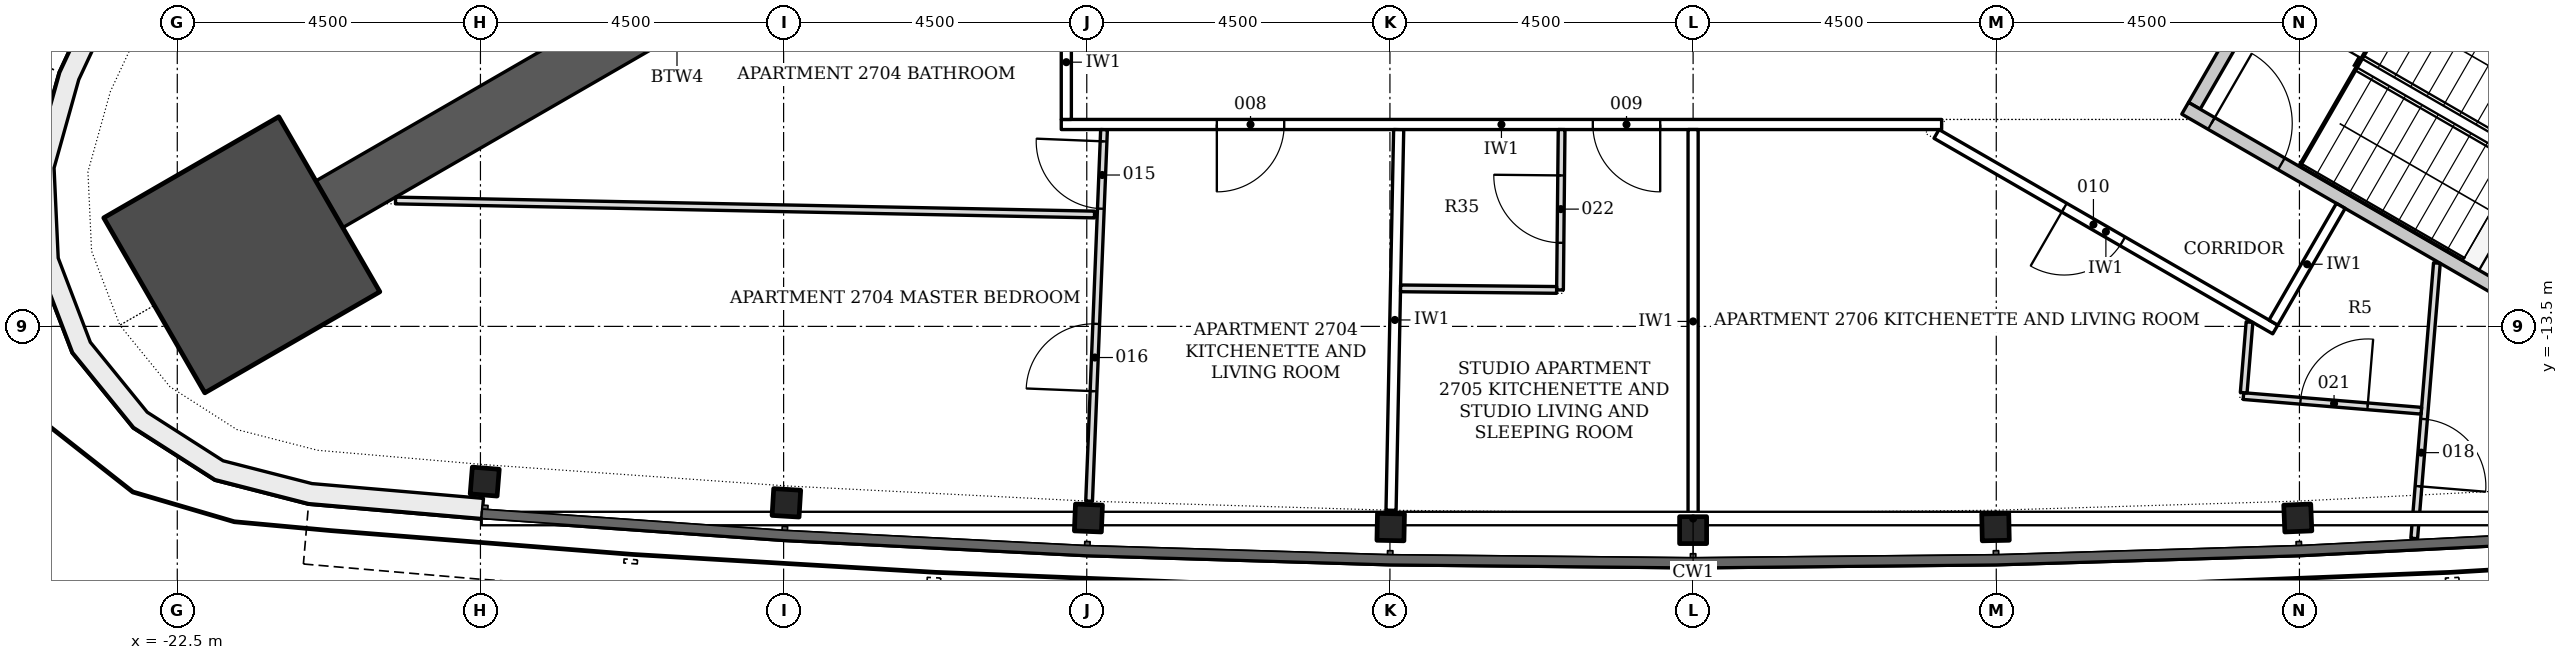
"""IFC4 building model, lengths in metres.
Left out: names, types, materials, properties, quantities, classifications, styles, units other than length and angle.
Written with IfcOpenShell. Run it as: python <this file> out.ifc"""

import sys

from ifc_helpers import new_model, si_unit, direction, frame, frame_2d, origin, origin_2d, place, context, subcontext, project, spatial, polyline, rectangle, i_section, outline, extrude, element, fill, save


model = new_model("IFC4")
c1 = context("Model", 3, precision=1e-05, world=origin(), true_north=direction((0.0, 1.0)))
c2 = subcontext(c1, "Body", "Model", "MODEL_VIEW")
j1 = project(units=[si_unit("LENGTHUNIT", "METRE"), si_unit("PLANEANGLEUNIT", "RADIAN")], contexts=[c1])
p1 = place(None, origin())
s1 = spatial("IfcSite", under=j1, at=p1, CompositionType="ELEMENT")
p2 = place(p1, origin())
s2 = spatial("IfcBuilding", under=s1, at=p2, CompositionType="ELEMENT")
p3 = place(p2, frame((0.0, 0.0, 105.9)))
s3 = spatial("IfcBuildingStorey", under=s2, at=p3, CompositionType="ELEMENT", Elevation=105.9)
for number, where, z_axis, x_axis in (
    (1, (-9.922, -5.728, -0.2), (0.0, 0.0, 1.0), (-0.866, -0.5, 0.0)),
    (2, (9.922, -5.728, -0.2), (0.0, 0.0, 1.0), (0.866, -0.5, 0.0)),
):
    element("IfcWall", number, at=place(p3, frame(where, z_axis=z_axis, x_axis=x_axis)), inside=s3, PredefinedType="SHEAR", context=c2, shape_type="SweptSolid", body=[
        extrude(rectangle(XDim=11.918, YDim=0.8, at=frame_2d((5.959, 0.0))), origin(), (0.0, 0.0, 1.0), 3.6),
    ])
p4 = place(p3, frame((-21.542, -12.438, -0.2), z_axis=(0.0, 0.0, 1.0), x_axis=(-0.866025403784, -0.5, 0.0)))
e3 = element("IfcColumn", 3, at=p4, inside=s3, PredefinedType="COLUMN", context=c2, shape_type="SweptSolid", body=[
    extrude(rectangle(XDim=3.0, YDim=3.0, at=origin_2d()), origin(), (0.0, 0.0, 1.0), 3.6),
])
for number, where, z_axis, x_axis in (
    (4, (-17.937, -15.804, -0.2), (0.0, 0.0, 1.0), (0.997, -0.08, 0.0)),
    (5, (-13.459, -16.119, -0.2), (0.0, 0.0, 1.0), (0.998, -0.06, 0.0)),
    (6, (-8.976, -16.344, -0.2), (0.0, 0.0, 1.0), (0.999, -0.04, 0.0)),
    (7, (-4.489, -16.479, -0.2), (0.0, 0.0, 1.0), (1.0, -0.02, 0.0)),
    (8, (0.0, -16.524, -0.2), (0.0, 0.0, 1.0), (1.0, 0.0, 0.0)),
    (9, (4.489, -16.479, -0.2), (0.0, 0.0, 1.0), (1.0, 0.02, 0.0)),
    (10, (8.976, -16.344, -0.2), (0.0, 0.0, 1.0), (0.999, 0.04, 0.0)),
):
    element("IfcColumn", number, at=place(p3, frame(where, z_axis=z_axis, x_axis=x_axis)), inside=s3, PredefinedType="COLUMN", context=c2, shape_type="SweptSolid", body=[
        extrude(i_section(OverallWidth=0.401, OverallDepth=0.399, WebThickness=0.025, FlangeThickness=0.04, FilletRadius=0.015, at=origin_2d()), origin(), (0.0, 0.0, 1.0), 3.6),
    ])
p5 = place(p3, origin())
e11 = element("IfcWall", 11, at=p5, inside=s3, PredefinedType="NOTDEFINED", context=c2, shape_type="SweptSolid", body=[
    extrude(outline(polyline([(-23.152, -7.396), (-24.245, -9.732), (-24.631, -11.114), (-24.565, -12.547), (-24.054, -13.887), (-23.148, -15.0), (-21.94, -15.774), (-20.551, -16.13), (-17.981, -16.352), (-17.955, -16.053), (-20.5, -15.833), (-21.819, -15.495), (-22.946, -14.774), (-23.791, -13.735), (-24.267, -12.485), (-24.329, -11.148), (-23.962, -9.837), (-22.88, -7.523), (-23.152, -7.396)])), origin(), (0.0, 0.0, 1.0), 3.3),
])
p6 = place(p3, frame((7.44, -10.226, -0.2), z_axis=(0.0, 0.0, 1.0), x_axis=(0.500022077904, 0.866012656725, 0.0)))
e12 = element("IfcWall", 12, at=p6, inside=s3, PredefinedType="SHEAR", context=c2, shape_type="SweptSolid", body=[
    extrude(rectangle(XDim=3.55, YDim=0.2, at=frame_2d((1.775, 0.0))), origin(), (0.0, 0.0, 1.0), 3.6),
])
p7 = place(p6, frame((1.175, 0.0, 0.2)))
e13 = element("IfcOpeningElement", 13, at=p7, cuts=e12, PredefinedType="OPENING", context=c2, shape_type="SweptSolid", body=[
    extrude(rectangle(XDim=1.2, YDim=2.1, at=frame_2d((0.6, 1.05))), frame((0.0, 0.11, 0.0), z_axis=(0.0, -1.0, 0.0), x_axis=(1.0, 0.0, 0.0)), (0.0, 0.0, 1.0), 0.22),
])
p8 = place(p3, frame((7.304, -10.262, -0.2), z_axis=(0.0, 0.0, 1.0), x_axis=(0.866026594901, -0.49999793692, 0.0)))
e14 = element("IfcWall", 14, at=p8, inside=s3, PredefinedType="SHEAR", context=c2, shape_type="SweptSolid", body=[
    extrude(rectangle(XDim=5.6, YDim=0.2, at=frame_2d((2.8, 0.0))), origin(), (0.0, 0.0, 1.0), 3.6),
])
p9 = place(p8, frame((0.45, 0.0, 0.2)))
e15 = element("IfcOpeningElement", 15, at=p9, cuts=e14, PredefinedType="OPENING", context=c2, shape_type="SweptSolid", body=[
    extrude(rectangle(XDim=1.2, YDim=2.1, at=frame_2d((0.6, 1.05))), frame((0.0, 0.11, 0.0), z_axis=(0.0, -1.0, 0.0), x_axis=(1.0, 0.0, 0.0)), (0.0, 0.0, 1.0), 0.22),
])
p10 = place(p3, frame((9.425, -6.588, -0.2), z_axis=(0.0, 0.0, 1.0), x_axis=(0.866018442252, -0.500012057535, 0.0)))
e16 = element("IfcWall", 16, at=p10, inside=s3, PredefinedType="SHEAR", context=c2, shape_type="SweptSolid", body=[
    extrude(rectangle(XDim=7.2, YDim=1.186, at=frame_2d((3.6, 0.0))), origin(), (0.0, 0.0, 1.0), 3.6),
])
p11 = place(p3, frame((3.689, -10.503, 0.0), z_axis=(0.0, 0.0, 1.0), x_axis=(-1.0, 0.0, 0.0)))
e17 = element("IfcWall", 17, at=p11, inside=s3, PredefinedType="PARTITIONING", context=c2, shape_type="SweptSolid", body=[
    extrude(rectangle(XDim=13.068, YDim=0.15, at=frame_2d((6.534, 0.0))), origin(), (0.0, 0.0, 1.0), 2.847),
])
p12 = place(p11, frame((9.758, 0.0, 0.0)))
e18 = element("IfcOpeningElement", 18, at=p12, cuts=e17, PredefinedType="OPENING", context=c2, shape_type="SweptSolid", body=[
    extrude(rectangle(XDim=1.0, YDim=2.1, at=frame_2d((0.5, 1.05))), frame((0.0, 0.085, 0.0), z_axis=(0.0, -1.0, 0.0), x_axis=(1.0, 0.0, 0.0)), (0.0, 0.0, 1.0), 0.17),
])
p13 = place(p11, frame((4.177, 0.0, 0.0)))
e19 = element("IfcOpeningElement", 19, at=p13, cuts=e17, PredefinedType="OPENING", context=c2, shape_type="SweptSolid", body=[
    extrude(rectangle(XDim=1.0, YDim=2.1, at=frame_2d((0.5, 1.05))), frame((0.0, 0.085, 0.0), z_axis=(0.0, -1.0, 0.0), x_axis=(1.0, 0.0, 0.0)), (0.0, 0.0, 1.0), 0.17),
])
p14 = place(p3, frame((8.641, -13.546, 0.0), z_axis=(0.0, 0.0, 1.0), x_axis=(-0.866042728627, 0.499969991291, 0.0)))
e20 = element("IfcWall", 20, at=p14, inside=s3, PredefinedType="PARTITIONING", context=c2, shape_type="SweptSolid", body=[
    extrude(rectangle(XDim=5.805, YDim=0.15, at=frame_2d((2.903, 0.0))), origin(), (0.0, 0.0, 1.0), 2.847),
])
p15 = place(p14, frame((2.616, 0.0, 0.0)))
e21 = element("IfcOpeningElement", 21, at=p15, cuts=e20, PredefinedType="OPENING", context=c2, shape_type="SweptSolid", body=[
    extrude(rectangle(XDim=1.0, YDim=2.1, at=frame_2d((0.5, 1.05))), frame((0.0, 0.085, 0.0), z_axis=(0.0, -1.0, 0.0), x_axis=(1.0, 0.0, 0.0)), (0.0, 0.0, 1.0), 0.17),
])
p16 = place(p3, frame((8.614, -13.444, 0.0), z_axis=(0.0, 0.0, 1.0), x_axis=(0.499972520799, 0.866041268327, 0.0)))
e22 = element("IfcWall", 22, at=p16, inside=s3, PredefinedType="PARTITIONING", context=c2, shape_type="SweptSolid", body=[
    extrude(rectangle(XDim=2.0, YDim=0.15, at=frame_2d((1.0, 0.0))), origin(), (0.0, 0.0, 1.0), 2.923),
])
p17 = place(p3, frame((-9.304, -10.428, 0.0), z_axis=(0.0, 0.0, 1.0), x_axis=(0.0, 1.0, 0.0)))
e23 = element("IfcWall", 23, at=p17, inside=s3, PredefinedType="PARTITIONING", context=c2, shape_type="SweptSolid", body=[
    extrude(rectangle(XDim=1.7, YDim=0.15, at=frame_2d((0.85, 0.0))), origin(), (0.0, 0.0, 1.0), 3.4),
])
p18 = place(p3, frame((0.0, -16.274, 0.0), z_axis=(0.0, 0.0, 1.0), x_axis=(0.0, 1.0, 0.0)))
e24 = element("IfcWall", 24, at=p18, inside=s3, PredefinedType="PARTITIONING", context=c2, shape_type="SweptSolid", body=[
    extrude(rectangle(XDim=5.696, YDim=0.15, at=frame_2d((2.848, 0.0))), origin(), (0.0, 0.0, 1.0), 2.847),
])
p19 = place(p3, frame((-4.484, -16.229, 0.0), z_axis=(0.0, 0.0, 1.0), x_axis=(0.020089281754, 0.999798190016, 0.0)))
e25 = element("IfcWall", 25, at=p19, inside=s3, PredefinedType="PARTITIONING", context=c2, shape_type="SweptSolid", body=[
    extrude(rectangle(XDim=5.651, YDim=0.15, at=frame_2d((2.826, 0.0))), origin(), (0.0, 0.0, 1.0), 2.847),
])
p20 = place(p3, frame((-8.885, -11.839, 0.0), z_axis=(0.0, 0.0, 1.0), x_axis=(-0.999798608679, 0.020068434987, 0.0)))
e26 = element("IfcWall", 26, at=p20, inside=s3, PredefinedType="PARTITIONING", context=c2, shape_type="SweptSolid", body=[
    extrude(rectangle(XDim=10.377, YDim=0.1, at=frame_2d((5.188, 0.0))), origin(), (0.0, 0.0, 1.0), 2.847),
])
p21 = place(p3, frame((-8.966, -16.094, 0.0), z_axis=(0.0, 0.0, 1.0), x_axis=(0.040167671745, 0.999192953411, 0.0)))
e27 = element("IfcWall", 27, at=p21, inside=s3, PredefinedType="PARTITIONING", context=c2, shape_type="SweptSolid", body=[
    extrude(rectangle(XDim=5.519, YDim=0.1, at=frame_2d((2.759, 0.0))), origin(), (0.0, 0.0, 1.0), 2.847),
])
p22 = place(p21, frame((4.345, 0.0, 0.0)))
e28 = element("IfcOpeningElement", 28, at=p22, cuts=e27, PredefinedType="OPENING", context=c2, shape_type="SweptSolid", body=[
    extrude(rectangle(XDim=1.0, YDim=2.1, at=frame_2d((0.5, 1.05))), frame((0.0, 0.06, 0.0), z_axis=(0.0, -1.0, 0.0), x_axis=(1.0, 0.0, 0.0)), (0.0, 0.0, 1.0), 0.12),
])
p23 = place(p21, frame((1.634, 0.0, 0.0)))
e29 = element("IfcOpeningElement", 29, at=p23, cuts=e27, PredefinedType="OPENING", context=c2, shape_type="SweptSolid", body=[
    extrude(rectangle(XDim=1.0, YDim=2.1, at=frame_2d((0.5, 1.05))), frame((0.0, 0.06, 0.0), z_axis=(0.0, -1.0, 0.0), x_axis=(1.0, 0.0, 0.0)), (0.0, 0.0, 1.0), 0.12),
])
p24 = place(p3, frame((11.04, -12.56, 0.0), z_axis=(0.0, 0.0, 1.0), x_axis=(-0.08207509454, -0.996626147989, 0.0)))
e30 = element("IfcWall", 30, at=p24, inside=s3, PredefinedType="PARTITIONING", context=c2, shape_type="SweptSolid", body=[
    extrude(rectangle(XDim=4.102, YDim=0.1, at=frame_2d((2.051, 0.0))), origin(), (0.0, 0.0, 1.0), 2.974),
])
p25 = place(p24, frame((2.324, 0.0, 0.0)))
e31 = element("IfcOpeningElement", 31, at=p25, cuts=e30, PredefinedType="OPENING", context=c2, shape_type="SweptSolid", body=[
    extrude(rectangle(XDim=1.0, YDim=2.1, at=frame_2d((0.5, 1.05))), frame((0.0, 0.06, 0.0), z_axis=(0.0, -1.0, 0.0), x_axis=(1.0, 0.0, 0.0)), (0.0, 0.0, 1.0), 0.12),
])
p26 = place(p3, frame((8.168, -14.534, 0.0), z_axis=(0.0, 0.0, 1.0), x_axis=(0.996625350035, -0.082084783406, 0.0)))
e32 = element("IfcWall", 32, at=p26, inside=s3, PredefinedType="PARTITIONING", context=c2, shape_type="SweptSolid", body=[
    extrude(rectangle(XDim=2.65, YDim=0.1, at=frame_2d((1.325, 0.0))), origin(), (0.0, 0.0, 1.0), 2.923),
])
p27 = place(p26, frame((0.85, 0.0, 0.0)))
e33 = element("IfcOpeningElement", 33, at=p27, cuts=e32, PredefinedType="OPENING", context=c2, shape_type="SweptSolid", body=[
    extrude(rectangle(XDim=1.0, YDim=2.1, at=frame_2d((0.5, 1.05))), frame((0.0, 0.06, 0.0), z_axis=(0.0, -1.0, 0.0), x_axis=(1.0, 0.0, 0.0)), (0.0, 0.0, 1.0), 0.12),
])
p28 = place(p3, frame((-1.976, -12.959, 0.0), z_axis=(0.0, 0.0, 1.0), x_axis=(0.009947205513, 0.999950525327, 0.0)))
e34 = element("IfcWall", 34, at=p28, inside=s3, PredefinedType="PARTITIONING", context=c2, shape_type="SweptSolid", body=[
    extrude(rectangle(XDim=2.381, YDim=0.1, at=frame_2d((1.19, 0.0))), origin(), (0.0, 0.0, 1.0), 3.4),
])
p29 = place(p28, frame((0.7, 0.0, 0.0)))
e35 = element("IfcOpeningElement", 35, at=p29, cuts=e34, PredefinedType="OPENING", context=c2, shape_type="SweptSolid", body=[
    extrude(rectangle(XDim=1.0, YDim=2.1, at=frame_2d((0.5, 1.05))), frame((0.0, 0.06, 0.0), z_axis=(0.0, -1.0, 0.0), x_axis=(1.0, 0.0, 0.0)), (0.0, 0.0, 1.0), 0.12),
])
p30 = place(p3, frame((-4.342, -12.936, 0.0), z_axis=(0.0, 0.0, 1.0), x_axis=(0.999949877213, -0.010012145693, 0.0)))
e36 = element("IfcWall", 36, at=p30, inside=s3, PredefinedType="PARTITIONING", context=c2, shape_type="SweptSolid", body=[
    extrude(rectangle(XDim=2.316, YDim=0.1, at=frame_2d((1.158, 0.0))), origin(), (0.0, 0.0, 1.0), 2.847),
])
p31 = place(p3, frame((8.259, -13.437, 0.0), z_axis=(0.0, 0.0, 1.0), x_axis=(-0.082180892167, -0.99661742959, 0.0)))
e37 = element("IfcWall", 37, at=p31, inside=s3, PredefinedType="PARTITIONING", context=c2, shape_type="SweptSolid", body=[
    extrude(rectangle(XDim=1.052, YDim=0.1, at=frame_2d((0.526, 0.0))), origin(), (0.0, 0.0, 1.0), 3.4),
])
p32 = place(p9, origin())
e38 = element("IfcDoor", 38, at=p32, inside=s3, OperationType="SINGLE_SWING_LEFT", PredefinedType="DOOR", context=c2, shape_type="SweptSolid", body=[
    extrude(rectangle(XDim=1.2, YDim=2.1, at=frame_2d((0.6, 1.05))), frame((0.0, 0.025, 0.0), z_axis=(0.0, -1.0, 0.0), x_axis=(1.0, 0.0, 0.0)), (0.0, 0.0, 1.0), 0.05),
])
fill(e15, e38)
p33 = place(p12, origin())
e39 = element("IfcDoor", 39, at=p33, inside=s3, OperationType="SINGLE_SWING_RIGHT", PredefinedType="DOOR", context=c2, shape_type="SweptSolid", body=[
    extrude(rectangle(XDim=1.0, YDim=2.1, at=frame_2d((0.5, 1.05))), frame((0.0, 0.025, 0.0), z_axis=(0.0, -1.0, 0.0), x_axis=(1.0, 0.0, 0.0)), (0.0, 0.0, 1.0), 0.05),
])
fill(e18, e39)
p34 = place(p13, origin())
e40 = element("IfcDoor", 40, at=p34, inside=s3, OperationType="SINGLE_SWING_LEFT", PredefinedType="DOOR", context=c2, shape_type="SweptSolid", body=[
    extrude(rectangle(XDim=1.0, YDim=2.1, at=frame_2d((0.5, 1.05))), frame((0.0, 0.025, 0.0), z_axis=(0.0, -1.0, 0.0), x_axis=(1.0, 0.0, 0.0)), (0.0, 0.0, 1.0), 0.05),
])
fill(e19, e40)
p35 = place(p15, origin())
e41 = element("IfcDoor", 41, at=p35, inside=s3, OperationType="SINGLE_SWING_RIGHT", PredefinedType="DOOR", context=c2, shape_type="SweptSolid", body=[
    extrude(rectangle(XDim=1.0, YDim=2.1, at=frame_2d((0.5, 1.05))), frame((0.0, 0.025, 0.0), z_axis=(0.0, -1.0, 0.0), x_axis=(1.0, 0.0, 0.0)), (0.0, 0.0, 1.0), 0.05),
])
fill(e21, e41)
p36 = place(p22, origin())
e42 = element("IfcDoor", 42, at=p36, inside=s3, OperationType="SINGLE_SWING_RIGHT", PredefinedType="DOOR", context=c2, shape_type="SweptSolid", body=[
    extrude(rectangle(XDim=1.0, YDim=2.1, at=frame_2d((0.5, 1.05))), frame((0.0, 0.025, 0.0), z_axis=(0.0, -1.0, 0.0), x_axis=(1.0, 0.0, 0.0)), (0.0, 0.0, 1.0), 0.05),
])
fill(e28, e42)
p37 = place(p23, origin())
e43 = element("IfcDoor", 43, at=p37, inside=s3, OperationType="SINGLE_SWING_LEFT", PredefinedType="DOOR", context=c2, shape_type="SweptSolid", body=[
    extrude(rectangle(XDim=1.0, YDim=2.1, at=frame_2d((0.5, 1.05))), frame((0.0, 0.025, 0.0), z_axis=(0.0, -1.0, 0.0), x_axis=(1.0, 0.0, 0.0)), (0.0, 0.0, 1.0), 0.05),
])
fill(e29, e43)
p38 = place(p25, origin())
e44 = element("IfcDoor", 44, at=p38, inside=s3, OperationType="SINGLE_SWING_RIGHT", PredefinedType="DOOR", context=c2, shape_type="SweptSolid", body=[
    extrude(rectangle(XDim=1.0, YDim=2.1, at=frame_2d((0.5, 1.05))), frame((0.0, 0.025, 0.0), z_axis=(0.0, -1.0, 0.0), x_axis=(1.0, 0.0, 0.0)), (0.0, 0.0, 1.0), 0.05),
])
fill(e31, e44)
p39 = place(p27, origin())
e45 = element("IfcDoor", 45, at=p39, inside=s3, OperationType="SINGLE_SWING_RIGHT", PredefinedType="DOOR", context=c2, shape_type="SweptSolid", body=[
    extrude(rectangle(XDim=1.0, YDim=2.1, at=frame_2d((0.5, 1.05))), frame((0.0, 0.025, 0.0), z_axis=(0.0, -1.0, 0.0), x_axis=(1.0, 0.0, 0.0)), (0.0, 0.0, 1.0), 0.05),
])
fill(e33, e45)
p40 = place(p29, origin())
e46 = element("IfcDoor", 46, at=p40, inside=s3, OperationType="SINGLE_SWING_RIGHT", PredefinedType="DOOR", context=c2, shape_type="SweptSolid", body=[
    extrude(rectangle(XDim=1.0, YDim=2.1, at=frame_2d((0.5, 1.05))), frame((0.0, 0.025, 0.0), z_axis=(0.0, -1.0, 0.0), x_axis=(1.0, 0.0, 0.0)), (0.0, 0.0, 1.0), 0.05),
])
fill(e35, e46)
save(model, sys.argv[1])
